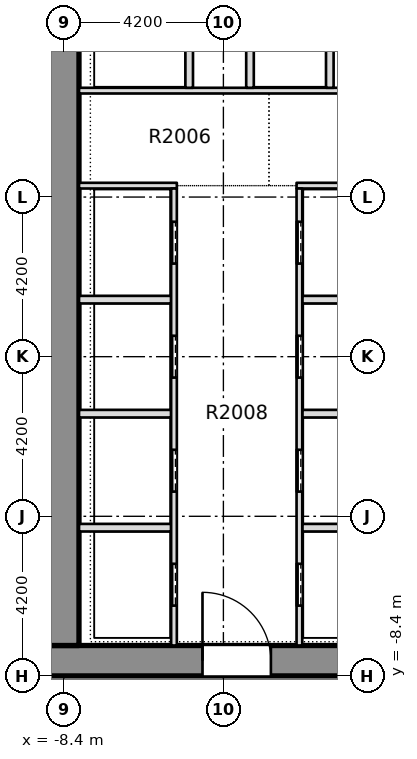
"""IFC4 building model, lengths in metres.
Left out: names, types, materials, properties, quantities, classifications, styles, units other than length and angle.
Written with IfcOpenShell. Run it as: python <this file> out.ifc"""

import sys

from ifc_helpers import new_model, si_unit, direction, frame, frame_2d, origin, place, context, subcontext, project, spatial, rectangle, extrude, element, fill, save


model = new_model("IFC4")
c1 = context("Model", 3, precision=1e-05, world=origin(), true_north=direction((0.0, 1.0)))
c2 = subcontext(c1, "Body", "Model", "MODEL_VIEW")
j1 = project(units=[si_unit("LENGTHUNIT", "METRE"), si_unit("PLANEANGLEUNIT", "RADIAN")], contexts=[c1])
p1 = place(None, origin())
s1 = spatial("IfcSite", under=j1, at=p1, CompositionType="ELEMENT")
p2 = place(p1, origin())
s2 = spatial("IfcBuilding", under=s1, at=p2, CompositionType="ELEMENT")
p3 = place(p2, frame((0.0, 0.0, 83.85)))
s3 = spatial("IfcBuildingStorey", under=s2, at=p3, CompositionType="ELEMENT", Elevation=83.85)
p4 = place(p3, frame((-11.8, -8.0, -0.32), z_axis=(0.0, 0.0, 1.0), x_axis=(1.0, 0.0, 0.0)))
e1 = element("IfcWall", 1, at=p4, inside=s3, PredefinedType="SHEAR", context=c2, shape_type="SweptSolid", body=[
    extrude(rectangle(XDim=23.6, YDim=0.8, at=frame_2d((11.8, 0.0))), origin(), (0.0, 0.0, 1.0), 3.45),
])
p5 = place(p4, frame((7.05, 0.0, 0.32)))
e2 = element("IfcOpeningElement", 2, at=p5, cuts=e1, PredefinedType="OPENING", context=c2, shape_type="SweptSolid", body=[
    extrude(rectangle(XDim=1.8, YDim=2.1, at=frame_2d((0.9, 1.05))), frame((0.0, 0.41, 0.0), z_axis=(0.0, -1.0, 0.0), x_axis=(1.0, 0.0, 0.0)), (0.0, 0.0, 1.0), 0.82),
])
p6 = place(p4, frame((14.75, 0.0, 0.32)))
e3 = element("IfcOpeningElement", 3, at=p6, cuts=e1, PredefinedType="OPENING", context=c2, shape_type="SweptSolid", body=[
    extrude(rectangle(XDim=1.8, YDim=2.1, at=frame_2d((0.9, 1.05))), frame((0.0, 0.41, 0.0), z_axis=(0.0, -1.0, 0.0), x_axis=(1.0, 0.0, 0.0)), (0.0, 0.0, 1.0), 0.82),
])
p7 = place(p3, frame((-8.4, -7.6, -0.32), z_axis=(0.0, 0.0, 1.0), x_axis=(0.0, 1.0, 0.0)))
e4 = element("IfcWall", 4, at=p7, inside=s3, PredefinedType="SHEAR", context=c2, shape_type="SweptSolid", body=[
    extrude(rectangle(XDim=28.55, YDim=0.8, at=frame_2d((14.275, 0.0))), origin(), (0.0, 0.0, 1.0), 3.45),
])
p8 = place(p7, frame((18.5, 0.0, 0.32)))
e5 = element("IfcOpeningElement", 5, at=p8, cuts=e4, PredefinedType="OPENING", context=c2, shape_type="SweptSolid", body=[
    extrude(rectangle(XDim=1.2, YDim=2.1, at=frame_2d((0.6, 1.05))), frame((0.0, 0.41, 0.0), z_axis=(0.0, -1.0, 0.0), x_axis=(1.0, 0.0, 0.0)), (0.0, 0.0, 1.0), 0.82),
])
p9 = place(p3, frame((-7.999, -4.5, 0.0), z_axis=(0.0, 0.0, 1.0), x_axis=(1.0, 0.0, 0.0)))
e6 = element("IfcWall", 6, at=p9, inside=s3, PredefinedType="PARTITIONING", context=c2, shape_type="SweptSolid", body=[
    extrude(rectangle(XDim=2.424, YDim=0.2, at=frame_2d((1.212, 0.0))), origin(), (0.0, 0.0, 1.0), 3.13),
])
p10 = place(p3, frame((-2.125, -4.5, 0.0), z_axis=(0.0, 0.0, 1.0), x_axis=(1.0, 0.0, 0.0)))
e7 = element("IfcWall", 7, at=p10, inside=s3, PredefinedType="PARTITIONING", context=c2, shape_type="SweptSolid", body=[
    extrude(rectangle(XDim=4.25, YDim=0.2, at=frame_2d((2.125, 0.0))), origin(), (0.0, 0.0, 1.0), 3.13),
])
p11 = place(p3, frame((-7.999, -1.5, 0.0), z_axis=(0.0, 0.0, 1.0), x_axis=(1.0, 0.0, 0.0)))
e8 = element("IfcWall", 8, at=p11, inside=s3, PredefinedType="PARTITIONING", context=c2, shape_type="SweptSolid", body=[
    extrude(rectangle(XDim=2.424, YDim=0.2, at=frame_2d((1.212, 0.0))), origin(), (0.0, 0.0, 1.0), 3.13),
])
p12 = place(p3, frame((-2.125, -1.5, 0.0), z_axis=(0.0, 0.0, 1.0), x_axis=(1.0, 0.0, 0.0)))
e9 = element("IfcWall", 9, at=p12, inside=s3, PredefinedType="PARTITIONING", context=c2, shape_type="SweptSolid", body=[
    extrude(rectangle(XDim=4.25, YDim=0.2, at=frame_2d((2.125, 0.0))), origin(), (0.0, 0.0, 1.0), 3.13),
])
p13 = place(p3, frame((-7.999, 1.5, 0.0), z_axis=(0.0, 0.0, 1.0), x_axis=(1.0, 0.0, 0.0)))
e10 = element("IfcWall", 10, at=p13, inside=s3, PredefinedType="PARTITIONING", context=c2, shape_type="SweptSolid", body=[
    extrude(rectangle(XDim=2.424, YDim=0.2, at=frame_2d((1.212, 0.0))), origin(), (0.0, 0.0, 1.0), 3.13),
])
p14 = place(p3, frame((-2.125, 1.5, 0.0), z_axis=(0.0, 0.0, 1.0), x_axis=(1.0, 0.0, 0.0)))
e11 = element("IfcWall", 11, at=p14, inside=s3, PredefinedType="PARTITIONING", context=c2, shape_type="SweptSolid", body=[
    extrude(rectangle(XDim=4.25, YDim=0.2, at=frame_2d((2.125, 0.0))), origin(), (0.0, 0.0, 1.0), 3.13),
])
p15 = place(p3, frame((-7.999, 4.5, 0.0), z_axis=(0.0, 0.0, 1.0), x_axis=(1.0, 0.0, 0.0)))
e12 = element("IfcWall", 12, at=p15, inside=s3, PredefinedType="PARTITIONING", context=c2, shape_type="SweptSolid", body=[
    extrude(rectangle(XDim=2.574, YDim=0.15, at=frame_2d((1.287, 0.0))), origin(), (0.0, 0.0, 1.0), 3.13),
])
p16 = place(p3, frame((-2.275, 4.5, 0.0), z_axis=(0.0, 0.0, 1.0), x_axis=(1.0, 0.0, 0.0)))
e13 = element("IfcWall", 13, at=p16, inside=s3, PredefinedType="PARTITIONING", context=c2, shape_type="SweptSolid", body=[
    extrude(rectangle(XDim=4.55, YDim=0.15, at=frame_2d((2.275, 0.0))), origin(), (0.0, 0.0, 1.0), 3.13),
])
p17 = place(p3, frame((-7.999, 7.0, 0.0), z_axis=(0.0, 0.0, 1.0), x_axis=(1.0, 0.0, 0.0)))
e14 = element("IfcWall", 14, at=p17, inside=s3, PredefinedType="PARTITIONING", context=c2, shape_type="SweptSolid", body=[
    extrude(rectangle(XDim=15.998, YDim=0.15, at=frame_2d((7.999, 0.0))), origin(), (0.0, 0.0, 1.0), 3.13),
])
p18 = place(p17, frame((7.299, 0.0, 0.0)))
e15 = element("IfcOpeningElement", 15, at=p18, cuts=e14, PredefinedType="OPENING", context=c2, shape_type="SweptSolid", body=[
    extrude(rectangle(XDim=1.4, YDim=2.1, at=frame_2d((0.7, 1.05))), frame((0.0, 0.085, 0.0), z_axis=(0.0, -1.0, 0.0), x_axis=(1.0, 0.0, 0.0)), (0.0, 0.0, 1.0), 0.17),
])
p19 = place(p3, frame((-5.5, -7.599, 0.0), z_axis=(0.0, 0.0, 1.0), x_axis=(0.0, 1.0, 0.0)))
e16 = element("IfcWall", 16, at=p19, inside=s3, PredefinedType="PARTITIONING", context=c2, shape_type="SweptSolid", body=[
    extrude(rectangle(XDim=12.024, YDim=0.15, at=frame_2d((6.012, 0.0))), origin(), (0.0, 0.0, 1.0), 3.13),
])
p20 = place(p19, frame((1.049, 0.0, 0.0)))
e17 = element("IfcOpeningElement", 17, at=p20, cuts=e16, PredefinedType="OPENING", context=c2, shape_type="SweptSolid", body=[
    extrude(rectangle(XDim=1.1, YDim=2.1, at=frame_2d((0.55, 1.05))), frame((0.0, 0.085, 0.0), z_axis=(0.0, -1.0, 0.0), x_axis=(1.0, 0.0, 0.0)), (0.0, 0.0, 1.0), 0.17),
])
p21 = place(p19, frame((4.049, 0.0, 0.0)))
e18 = element("IfcOpeningElement", 18, at=p21, cuts=e16, PredefinedType="OPENING", context=c2, shape_type="SweptSolid", body=[
    extrude(rectangle(XDim=1.1, YDim=2.1, at=frame_2d((0.55, 1.05))), frame((0.0, 0.085, 0.0), z_axis=(0.0, -1.0, 0.0), x_axis=(1.0, 0.0, 0.0)), (0.0, 0.0, 1.0), 0.17),
])
p22 = place(p19, frame((7.049, 0.0, 0.0)))
e19 = element("IfcOpeningElement", 19, at=p22, cuts=e16, PredefinedType="OPENING", context=c2, shape_type="SweptSolid", body=[
    extrude(rectangle(XDim=1.1, YDim=2.1, at=frame_2d((0.55, 1.05))), frame((0.0, 0.085, 0.0), z_axis=(0.0, -1.0, 0.0), x_axis=(1.0, 0.0, 0.0)), (0.0, 0.0, 1.0), 0.17),
])
p23 = place(p19, frame((10.049, 0.0, 0.0)))
e20 = element("IfcOpeningElement", 20, at=p23, cuts=e16, PredefinedType="OPENING", context=c2, shape_type="SweptSolid", body=[
    extrude(rectangle(XDim=1.1, YDim=2.1, at=frame_2d((0.55, 1.05))), frame((0.0, 0.085, 0.0), z_axis=(0.0, -1.0, 0.0), x_axis=(1.0, 0.0, 0.0)), (0.0, 0.0, 1.0), 0.17),
])
p24 = place(p3, frame((-5.1, 7.075, 0.0), z_axis=(0.0, 0.0, 1.0), x_axis=(0.0, 1.0, 0.0)))
e21 = element("IfcWall", 21, at=p24, inside=s3, PredefinedType="PARTITIONING", context=c2, shape_type="SweptSolid", body=[
    extrude(rectangle(XDim=2.725, YDim=0.2, at=frame_2d((1.363, 0.0))), origin(), (0.0, 0.0, 1.0), 3.13),
])
p25 = place(p3, frame((-3.5, 7.075, 0.0), z_axis=(0.0, 0.0, 1.0), x_axis=(0.0, 1.0, 0.0)))
e22 = element("IfcWall", 22, at=p25, inside=s3, PredefinedType="PARTITIONING", context=c2, shape_type="SweptSolid", body=[
    extrude(rectangle(XDim=2.85, YDim=0.2, at=frame_2d((1.425, 0.0))), origin(), (0.0, 0.0, 1.0), 3.13),
])
p26 = place(p3, frame((-2.2, -7.599, 0.0), z_axis=(0.0, 0.0, 1.0), x_axis=(0.0, 1.0, 0.0)))
e23 = element("IfcWall", 23, at=p26, inside=s3, PredefinedType="PARTITIONING", context=c2, shape_type="SweptSolid", body=[
    extrude(rectangle(XDim=12.024, YDim=0.15, at=frame_2d((6.012, 0.0))), origin(), (0.0, 0.0, 1.0), 3.13),
])
p27 = place(p26, frame((1.049, 0.0, 0.0)))
e24 = element("IfcOpeningElement", 24, at=p27, cuts=e23, PredefinedType="OPENING", context=c2, shape_type="SweptSolid", body=[
    extrude(rectangle(XDim=1.1, YDim=2.1, at=frame_2d((0.55, 1.05))), frame((0.0, 0.085, 0.0), z_axis=(0.0, -1.0, 0.0), x_axis=(1.0, 0.0, 0.0)), (0.0, 0.0, 1.0), 0.17),
])
p28 = place(p26, frame((4.049, 0.0, 0.0)))
e25 = element("IfcOpeningElement", 25, at=p28, cuts=e23, PredefinedType="OPENING", context=c2, shape_type="SweptSolid", body=[
    extrude(rectangle(XDim=1.1, YDim=2.1, at=frame_2d((0.55, 1.05))), frame((0.0, 0.085, 0.0), z_axis=(0.0, -1.0, 0.0), x_axis=(1.0, 0.0, 0.0)), (0.0, 0.0, 1.0), 0.17),
])
p29 = place(p26, frame((7.049, 0.0, 0.0)))
e26 = element("IfcOpeningElement", 26, at=p29, cuts=e23, PredefinedType="OPENING", context=c2, shape_type="SweptSolid", body=[
    extrude(rectangle(XDim=1.1, YDim=2.1, at=frame_2d((0.55, 1.05))), frame((0.0, 0.085, 0.0), z_axis=(0.0, -1.0, 0.0), x_axis=(1.0, 0.0, 0.0)), (0.0, 0.0, 1.0), 0.17),
])
p30 = place(p26, frame((10.049, 0.0, 0.0)))
e27 = element("IfcOpeningElement", 27, at=p30, cuts=e23, PredefinedType="OPENING", context=c2, shape_type="SweptSolid", body=[
    extrude(rectangle(XDim=1.1, YDim=2.1, at=frame_2d((0.55, 1.05))), frame((0.0, 0.085, 0.0), z_axis=(0.0, -1.0, 0.0), x_axis=(1.0, 0.0, 0.0)), (0.0, 0.0, 1.0), 0.17),
])
p31 = place(p3, frame((-1.4, 7.075, 0.0), z_axis=(0.0, 0.0, 1.0), x_axis=(0.0, 1.0, 0.0)))
e28 = element("IfcWall", 28, at=p31, inside=s3, PredefinedType="PARTITIONING", context=c2, shape_type="SweptSolid", body=[
    extrude(rectangle(XDim=2.85, YDim=0.2, at=frame_2d((1.425, 0.0))), origin(), (0.0, 0.0, 1.0), 3.13),
])
p32 = place(p20, origin())
e29 = element("IfcDoor", 29, at=p32, inside=s3, OperationType="SLIDING_TO_LEFT", PredefinedType="DOOR", context=c2, shape_type="SweptSolid", body=[
    extrude(rectangle(XDim=1.1, YDim=2.1, at=frame_2d((0.55, 1.05))), frame((0.0, 0.025, 0.0), z_axis=(0.0, -1.0, 0.0), x_axis=(1.0, 0.0, 0.0)), (0.0, 0.0, 1.0), 0.05),
])
fill(e17, e29)
p33 = place(p21, origin())
e30 = element("IfcDoor", 30, at=p33, inside=s3, OperationType="SLIDING_TO_LEFT", PredefinedType="DOOR", context=c2, shape_type="SweptSolid", body=[
    extrude(rectangle(XDim=1.1, YDim=2.1, at=frame_2d((0.55, 1.05))), frame((0.0, 0.025, 0.0), z_axis=(0.0, -1.0, 0.0), x_axis=(1.0, 0.0, 0.0)), (0.0, 0.0, 1.0), 0.05),
])
fill(e18, e30)
p34 = place(p22, origin())
e31 = element("IfcDoor", 31, at=p34, inside=s3, OperationType="SLIDING_TO_LEFT", PredefinedType="DOOR", context=c2, shape_type="SweptSolid", body=[
    extrude(rectangle(XDim=1.1, YDim=2.1, at=frame_2d((0.55, 1.05))), frame((0.0, 0.025, 0.0), z_axis=(0.0, -1.0, 0.0), x_axis=(1.0, 0.0, 0.0)), (0.0, 0.0, 1.0), 0.05),
])
fill(e19, e31)
p35 = place(p23, origin())
e32 = element("IfcDoor", 32, at=p35, inside=s3, OperationType="SLIDING_TO_LEFT", PredefinedType="DOOR", context=c2, shape_type="SweptSolid", body=[
    extrude(rectangle(XDim=1.1, YDim=2.1, at=frame_2d((0.55, 1.05))), frame((0.0, 0.025, 0.0), z_axis=(0.0, -1.0, 0.0), x_axis=(1.0, 0.0, 0.0)), (0.0, 0.0, 1.0), 0.05),
])
fill(e20, e32)
p36 = place(p27, origin())
e33 = element("IfcDoor", 33, at=p36, inside=s3, OperationType="SLIDING_TO_LEFT", PredefinedType="DOOR", context=c2, shape_type="SweptSolid", body=[
    extrude(rectangle(XDim=1.1, YDim=2.1, at=frame_2d((0.55, 1.05))), frame((0.0, 0.025, 0.0), z_axis=(0.0, -1.0, 0.0), x_axis=(1.0, 0.0, 0.0)), (0.0, 0.0, 1.0), 0.05),
])
fill(e24, e33)
p37 = place(p28, origin())
e34 = element("IfcDoor", 34, at=p37, inside=s3, OperationType="SLIDING_TO_LEFT", PredefinedType="DOOR", context=c2, shape_type="SweptSolid", body=[
    extrude(rectangle(XDim=1.1, YDim=2.1, at=frame_2d((0.55, 1.05))), frame((0.0, 0.025, 0.0), z_axis=(0.0, -1.0, 0.0), x_axis=(1.0, 0.0, 0.0)), (0.0, 0.0, 1.0), 0.05),
])
fill(e25, e34)
p38 = place(p29, origin())
e35 = element("IfcDoor", 35, at=p38, inside=s3, OperationType="SLIDING_TO_LEFT", PredefinedType="DOOR", context=c2, shape_type="SweptSolid", body=[
    extrude(rectangle(XDim=1.1, YDim=2.1, at=frame_2d((0.55, 1.05))), frame((0.0, 0.025, 0.0), z_axis=(0.0, -1.0, 0.0), x_axis=(1.0, 0.0, 0.0)), (0.0, 0.0, 1.0), 0.05),
])
fill(e26, e35)
p39 = place(p30, origin())
e36 = element("IfcDoor", 36, at=p39, inside=s3, OperationType="SLIDING_TO_LEFT", PredefinedType="DOOR", context=c2, shape_type="SweptSolid", body=[
    extrude(rectangle(XDim=1.1, YDim=2.1, at=frame_2d((0.55, 1.05))), frame((0.0, 0.025, 0.0), z_axis=(0.0, -1.0, 0.0), x_axis=(1.0, 0.0, 0.0)), (0.0, 0.0, 1.0), 0.05),
])
fill(e27, e36)
p40 = place(p5, origin())
e37 = element("IfcDoor", 37, at=p40, inside=s3, OperationType="SINGLE_SWING_LEFT", PredefinedType="DOOR", context=c2, shape_type="SweptSolid", body=[
    extrude(rectangle(XDim=1.8, YDim=2.1, at=frame_2d((0.9, 1.05))), frame((0.0, 0.025, 0.0), z_axis=(0.0, -1.0, 0.0), x_axis=(1.0, 0.0, 0.0)), (0.0, 0.0, 1.0), 0.05),
])
fill(e2, e37)
save(model, sys.argv[1])
